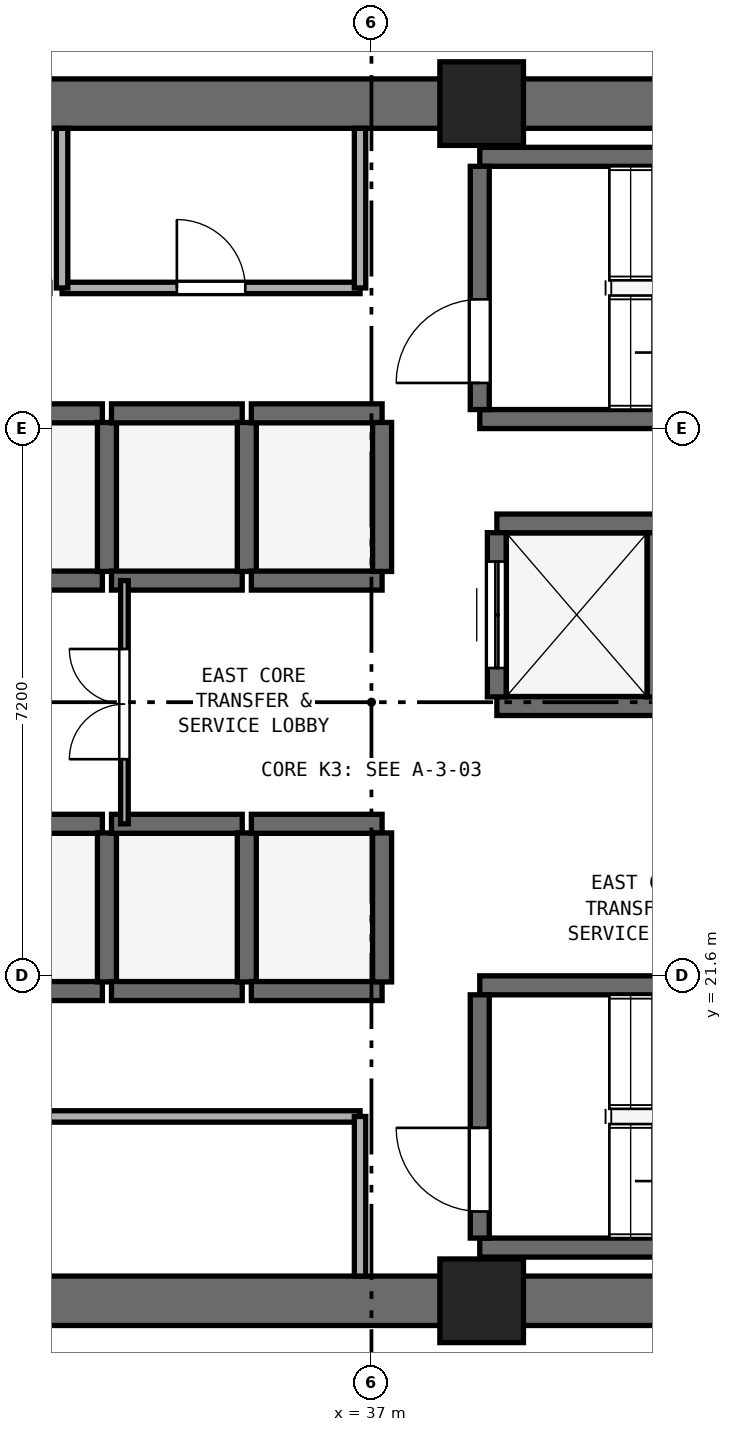
"""IFC4 building model, lengths in metres.
Left out: names, types, materials, properties, quantities, classifications, styles, units other than length and angle.
Written with IfcOpenShell. Run it as: python <this file> out.ifc"""

import sys

from ifc_helpers import new_model, si_unit, direction, frame, frame_2d, origin, origin_2d, place, context, subcontext, project, spatial, rectangle, extrude, element, fill, save


model = new_model("IFC4")
c1 = context("Model", 3, precision=1e-05, world=origin(), true_north=direction((0.0, 1.0)))
c2 = subcontext(c1, "Body", "Model", "MODEL_VIEW")
j1 = project(units=[si_unit("LENGTHUNIT", "METRE"), si_unit("PLANEANGLEUNIT", "RADIAN")], contexts=[c1])
p1 = place(None, origin())
s1 = spatial("IfcSite", under=j1, at=p1, CompositionType="ELEMENT")
p2 = place(p1, origin())
s2 = spatial("IfcBuilding", under=s1, at=p2, CompositionType="ELEMENT")
p3 = place(p2, frame((0.0, 0.0, 47.8)))
s3 = spatial("IfcBuildingStorey", under=s2, at=p3, CompositionType="ELEMENT", Elevation=47.8)
for number, where, z_axis, x_axis in (
    (1, (25.4, 17.325, 0.0), (0.0, 0.0, 1.0), (1.0, 0.0, 0.0)),
    (2, (25.4, 33.075, 0.0), (0.0, 0.0, 1.0), (1.0, 0.0, 0.0)),
):
    element("IfcWall", number, at=place(p3, frame(where, z_axis=z_axis, x_axis=x_axis)), inside=s3, PredefinedType="SHEAR", context=c2, shape_type="SweptSolid", body=[
        extrude(rectangle(XDim=23.2, YDim=0.65, at=frame_2d((11.6, 0.0))), origin(), (0.0, 0.0, 1.0), 3.525),
    ])
for number, where, z_axis, x_axis in (
    (3, (38.45, 17.325, 0.0), (0.0, 0.0, 1.0), (1.0, 0.0, 0.0)),
    (4, (38.45, 33.075, 0.0), (0.0, 0.0, 1.0), (1.0, 0.0, 0.0)),
):
    element("IfcColumn", number, at=place(p3, frame(where, z_axis=z_axis, x_axis=x_axis)), inside=s3, PredefinedType="PILASTER", context=c2, shape_type="SweptSolid", body=[
        extrude(rectangle(XDim=1.1, YDim=1.1, at=origin_2d()), origin(), (0.0, 0.0, 1.0), 3.8),
    ])
for number, where, z_axis, x_axis in (
    (5, (38.425, 28.925, 0.0), (0.0, 0.0, 1.0), (1.0, 0.0, 0.0)),
    (6, (38.425, 32.375, 0.0), (0.0, 0.0, 1.0), (1.0, 0.0, 0.0)),
):
    element("IfcWall", number, at=place(p3, frame(where, z_axis=z_axis, x_axis=x_axis)), inside=s3, PredefinedType="SHEAR", context=c2, shape_type="SweptSolid", body=[
        extrude(rectangle(XDim=7.3, YDim=0.25, at=frame_2d((3.65, 0.0))), origin(), (0.0, 0.0, 1.0), 3.525),
    ])
p4 = place(p3, frame((38.425, 29.05, 0.0), z_axis=(0.0, 0.0, 1.0), x_axis=(0.0, 1.0, 0.0)))
e7 = element("IfcWall", 7, at=p4, inside=s3, PredefinedType="SHEAR", context=c2, shape_type="SweptSolid", body=[
    extrude(rectangle(XDim=3.2, YDim=0.25, at=frame_2d((1.6, 0.0))), origin(), (0.0, 0.0, 1.0), 3.525),
])
p5 = place(p4, frame((0.35, 0.0, 0.0)))
e8 = element("IfcOpeningElement", 8, at=p5, cuts=e7, PredefinedType="OPENING", context=c2, shape_type="SweptSolid", body=[
    extrude(rectangle(XDim=1.1, YDim=2.15, at=frame_2d((0.55, 1.075))), frame((0.0, 0.135, 0.0), z_axis=(0.0, -1.0, 0.0), x_axis=(1.0, 0.0, 0.0)), (0.0, 0.0, 1.0), 0.27),
])
for number, where, z_axis, x_axis in (
    (9, (38.425, 18.025, 0.0), (0.0, 0.0, 1.0), (1.0, 0.0, 0.0)),
    (10, (38.425, 21.475, 0.0), (0.0, 0.0, 1.0), (1.0, 0.0, 0.0)),
):
    element("IfcWall", number, at=place(p3, frame(where, z_axis=z_axis, x_axis=x_axis)), inside=s3, PredefinedType="SHEAR", context=c2, shape_type="SweptSolid", body=[
        extrude(rectangle(XDim=7.3, YDim=0.25, at=frame_2d((3.65, 0.0))), origin(), (0.0, 0.0, 1.0), 3.525),
    ])
p6 = place(p3, frame((38.425, 18.15, 0.0), z_axis=(0.0, 0.0, 1.0), x_axis=(0.0, 1.0, 0.0)))
e11 = element("IfcWall", 11, at=p6, inside=s3, PredefinedType="SHEAR", context=c2, shape_type="SweptSolid", body=[
    extrude(rectangle(XDim=3.2, YDim=0.25, at=frame_2d((1.6, 0.0))), origin(), (0.0, 0.0, 1.0), 3.525),
])
p7 = place(p6, frame((0.35, 0.0, 0.0)))
e12 = element("IfcOpeningElement", 12, at=p7, cuts=e11, PredefinedType="OPENING", context=c2, shape_type="SweptSolid", body=[
    extrude(rectangle(XDim=1.1, YDim=2.15, at=frame_2d((0.55, 1.075))), frame((0.0, 0.135, 0.0), z_axis=(0.0, -1.0, 0.0), x_axis=(1.0, 0.0, 0.0)), (0.0, 0.0, 1.0), 0.27),
])
for number, where, z_axis, x_axis in (
    (13, (31.74, 21.4, 0.0), (0.0, 0.0, 1.0), (1.0, 0.0, 0.0)),
    (14, (31.74, 23.6, 0.0), (0.0, 0.0, 1.0), (1.0, 0.0, 0.0)),
):
    element("IfcWall", number, at=place(p3, frame(where, z_axis=z_axis, x_axis=x_axis)), inside=s3, PredefinedType="SHEAR", context=c2, shape_type="SweptSolid", body=[
        extrude(rectangle(XDim=1.72, YDim=0.25, at=frame_2d((0.86, 0.0))), origin(), (0.0, 0.0, 1.0), 3.525),
    ])
p8 = place(p3, frame((33.52, 21.52, 0.0), z_axis=(0.0, 0.0, 1.0), x_axis=(0.0, 1.0, 0.0)))
e15 = element("IfcWall", 15, at=p8, inside=s3, PredefinedType="SHEAR", context=c2, shape_type="SweptSolid", body=[
    extrude(rectangle(XDim=1.96, YDim=0.25, at=frame_2d((0.98, 0.0))), origin(), (0.0, 0.0, 1.0), 3.525),
])
for number, where, z_axis, x_axis in (
    (16, (33.58, 21.4, 0.0), (0.0, 0.0, 1.0), (1.0, 0.0, 0.0)),
    (17, (33.58, 23.6, 0.0), (0.0, 0.0, 1.0), (1.0, 0.0, 0.0)),
):
    element("IfcWall", number, at=place(p3, frame(where, z_axis=z_axis, x_axis=x_axis)), inside=s3, PredefinedType="SHEAR", context=c2, shape_type="SweptSolid", body=[
        extrude(rectangle(XDim=1.72, YDim=0.25, at=frame_2d((0.86, 0.0))), origin(), (0.0, 0.0, 1.0), 3.525),
    ])
p9 = place(p3, frame((35.36, 21.52, 0.0), z_axis=(0.0, 0.0, 1.0), x_axis=(0.0, 1.0, 0.0)))
e18 = element("IfcWall", 18, at=p9, inside=s3, PredefinedType="SHEAR", context=c2, shape_type="SweptSolid", body=[
    extrude(rectangle(XDim=1.96, YDim=0.25, at=frame_2d((0.98, 0.0))), origin(), (0.0, 0.0, 1.0), 3.525),
])
for number, where, z_axis, x_axis in (
    (19, (35.42, 21.4, 0.0), (0.0, 0.0, 1.0), (1.0, 0.0, 0.0)),
    (20, (35.42, 23.6, 0.0), (0.0, 0.0, 1.0), (1.0, 0.0, 0.0)),
):
    element("IfcWall", number, at=place(p3, frame(where, z_axis=z_axis, x_axis=x_axis)), inside=s3, PredefinedType="SHEAR", context=c2, shape_type="SweptSolid", body=[
        extrude(rectangle(XDim=1.72, YDim=0.25, at=frame_2d((0.86, 0.0))), origin(), (0.0, 0.0, 1.0), 3.525),
    ])
p10 = place(p3, frame((37.14, 21.52, 0.0), z_axis=(0.0, 0.0, 1.0), x_axis=(0.0, 1.0, 0.0)))
e21 = element("IfcWall", 21, at=p10, inside=s3, PredefinedType="SHEAR", context=c2, shape_type="SweptSolid", body=[
    extrude(rectangle(XDim=1.96, YDim=0.25, at=frame_2d((0.98, 0.0))), origin(), (0.0, 0.0, 1.0), 3.525),
])
for number, where, z_axis, x_axis in (
    (22, (31.74, 26.8, 0.0), (0.0, 0.0, 1.0), (1.0, 0.0, 0.0)),
    (23, (31.74, 29.0, 0.0), (0.0, 0.0, 1.0), (1.0, 0.0, 0.0)),
):
    element("IfcWall", number, at=place(p3, frame(where, z_axis=z_axis, x_axis=x_axis)), inside=s3, PredefinedType="SHEAR", context=c2, shape_type="SweptSolid", body=[
        extrude(rectangle(XDim=1.72, YDim=0.25, at=frame_2d((0.86, 0.0))), origin(), (0.0, 0.0, 1.0), 3.525),
    ])
p11 = place(p3, frame((33.52, 26.92, 0.0), z_axis=(0.0, 0.0, 1.0), x_axis=(0.0, 1.0, 0.0)))
e24 = element("IfcWall", 24, at=p11, inside=s3, PredefinedType="SHEAR", context=c2, shape_type="SweptSolid", body=[
    extrude(rectangle(XDim=1.96, YDim=0.25, at=frame_2d((0.98, 0.0))), origin(), (0.0, 0.0, 1.0), 3.525),
])
for number, where, z_axis, x_axis in (
    (25, (33.58, 26.8, 0.0), (0.0, 0.0, 1.0), (1.0, 0.0, 0.0)),
    (26, (33.58, 29.0, 0.0), (0.0, 0.0, 1.0), (1.0, 0.0, 0.0)),
):
    element("IfcWall", number, at=place(p3, frame(where, z_axis=z_axis, x_axis=x_axis)), inside=s3, PredefinedType="SHEAR", context=c2, shape_type="SweptSolid", body=[
        extrude(rectangle(XDim=1.72, YDim=0.25, at=frame_2d((0.86, 0.0))), origin(), (0.0, 0.0, 1.0), 3.525),
    ])
p12 = place(p3, frame((35.36, 26.92, 0.0), z_axis=(0.0, 0.0, 1.0), x_axis=(0.0, 1.0, 0.0)))
e27 = element("IfcWall", 27, at=p12, inside=s3, PredefinedType="SHEAR", context=c2, shape_type="SweptSolid", body=[
    extrude(rectangle(XDim=1.96, YDim=0.25, at=frame_2d((0.98, 0.0))), origin(), (0.0, 0.0, 1.0), 3.525),
])
for number, where, z_axis, x_axis in (
    (28, (35.42, 26.8, 0.0), (0.0, 0.0, 1.0), (1.0, 0.0, 0.0)),
    (29, (35.42, 29.0, 0.0), (0.0, 0.0, 1.0), (1.0, 0.0, 0.0)),
):
    element("IfcWall", number, at=place(p3, frame(where, z_axis=z_axis, x_axis=x_axis)), inside=s3, PredefinedType="SHEAR", context=c2, shape_type="SweptSolid", body=[
        extrude(rectangle(XDim=1.72, YDim=0.25, at=frame_2d((0.86, 0.0))), origin(), (0.0, 0.0, 1.0), 3.525),
    ])
p13 = place(p3, frame((37.14, 26.92, 0.0), z_axis=(0.0, 0.0, 1.0), x_axis=(0.0, 1.0, 0.0)))
e30 = element("IfcWall", 30, at=p13, inside=s3, PredefinedType="SHEAR", context=c2, shape_type="SweptSolid", body=[
    extrude(rectangle(XDim=1.96, YDim=0.25, at=frame_2d((0.98, 0.0))), origin(), (0.0, 0.0, 1.0), 3.525),
])
for number, where, z_axis, x_axis in (
    (31, (38.65, 25.15, 0.0), (0.0, 0.0, 1.0), (1.0, 0.0, 0.0)),
    (32, (38.65, 27.55, 0.0), (0.0, 0.0, 1.0), (1.0, 0.0, 0.0)),
):
    element("IfcWall", number, at=place(p3, frame(where, z_axis=z_axis, x_axis=x_axis)), inside=s3, PredefinedType="SHEAR", context=c2, shape_type="SweptSolid", body=[
        extrude(rectangle(XDim=2.1, YDim=0.25, at=frame_2d((1.05, 0.0))), origin(), (0.0, 0.0, 1.0), 3.525),
    ])
p14 = place(p3, frame((38.65, 25.27, 0.0), z_axis=(0.0, 0.0, 1.0), x_axis=(0.0, 1.0, 0.0)))
e33 = element("IfcWall", 33, at=p14, inside=s3, PredefinedType="SHEAR", context=c2, shape_type="SweptSolid", body=[
    extrude(rectangle(XDim=2.16, YDim=0.25, at=frame_2d((1.08, 0.0))), origin(), (0.0, 0.0, 1.0), 3.525),
])
p15 = place(p14, frame((0.38, 0.0, 0.0)))
e34 = element("IfcOpeningElement", 34, at=p15, cuts=e33, PredefinedType="OPENING", context=c2, shape_type="SweptSolid", body=[
    extrude(rectangle(XDim=1.4, YDim=2.2, at=frame_2d((0.7, 1.1))), frame((0.0, 0.135, 0.0), z_axis=(0.0, -1.0, 0.0), x_axis=(1.0, 0.0, 0.0)), (0.0, 0.0, 1.0), 0.27),
])
p16 = place(p3, frame((40.75, 25.27, 0.0), z_axis=(0.0, 0.0, 1.0), x_axis=(0.0, 1.0, 0.0)))
e35 = element("IfcWall", 35, at=p16, inside=s3, PredefinedType="SHEAR", context=c2, shape_type="SweptSolid", body=[
    extrude(rectangle(XDim=2.16, YDim=0.25, at=frame_2d((1.08, 0.0))), origin(), (0.0, 0.0, 1.0), 3.525),
])
p17 = place(p3, frame((32.93, 30.65, 0.0), z_axis=(0.0, 0.0, 1.0), x_axis=(1.0, 0.0, 0.0)))
e36 = element("IfcWall", 36, at=p17, inside=s3, PredefinedType="PARTITIONING", context=c2, shape_type="SweptSolid", body=[
    extrude(rectangle(XDim=3.92, YDim=0.15, at=frame_2d((1.96, 0.0))), origin(), (0.0, 0.0, 1.0), 3.525),
])
p18 = place(p17, frame((1.51, 0.0, 0.0)))
e37 = element("IfcOpeningElement", 37, at=p18, cuts=e36, PredefinedType="OPENING", context=c2, shape_type="SweptSolid", body=[
    extrude(rectangle(XDim=0.9, YDim=2.1, at=frame_2d((0.45, 1.05))), frame((0.0, 0.085, 0.0), z_axis=(0.0, -1.0, 0.0), x_axis=(1.0, 0.0, 0.0)), (0.0, 0.0, 1.0), 0.17),
])
for number, where, z_axis, x_axis in (
    (38, (32.93, 30.65, 0.0), (0.0, 0.0, 1.0), (0.0, 1.0, 0.0)),
    (39, (36.85, 30.65, 0.0), (0.0, 0.0, 1.0), (0.0, 1.0, 0.0)),
):
    element("IfcWall", number, at=place(p3, frame(where, z_axis=z_axis, x_axis=x_axis)), inside=s3, PredefinedType="PARTITIONING", context=c2, shape_type="SweptSolid", body=[
        extrude(rectangle(XDim=2.1, YDim=0.15, at=frame_2d((1.05, 0.0))), origin(), (0.0, 0.0, 1.0), 3.525),
    ])
p19 = place(p3, frame((26.17, 19.75, 0.0), z_axis=(0.0, 0.0, 1.0), x_axis=(1.0, 0.0, 0.0)))
e40 = element("IfcWall", 40, at=p19, inside=s3, PredefinedType="PARTITIONING", context=c2, shape_type="SweptSolid", body=[
    extrude(rectangle(XDim=10.68, YDim=0.15, at=frame_2d((5.34, 0.0))), origin(), (0.0, 0.0, 1.0), 3.525),
])
p20 = place(p19, frame((4.865, 0.0, 0.0)))
e41 = element("IfcOpeningElement", 41, at=p20, cuts=e40, PredefinedType="OPENING", context=c2, shape_type="SweptSolid", body=[
    extrude(rectangle(XDim=0.95, YDim=2.1, at=frame_2d((0.475, 1.05))), frame((0.0, 0.085, 0.0), z_axis=(0.0, -1.0, 0.0), x_axis=(1.0, 0.0, 0.0)), (0.0, 0.0, 1.0), 0.17),
])
p21 = place(p3, frame((36.85, 17.65, 0.0), z_axis=(0.0, 0.0, 1.0), x_axis=(0.0, 1.0, 0.0)))
e42 = element("IfcWall", 42, at=p21, inside=s3, PredefinedType="PARTITIONING", context=c2, shape_type="SweptSolid", body=[
    extrude(rectangle(XDim=2.1, YDim=0.15, at=frame_2d((1.05, 0.0))), origin(), (0.0, 0.0, 1.0), 3.525),
])
p22 = place(p3, frame((33.75, 23.6, 0.0), z_axis=(0.0, 0.0, 1.0), x_axis=(0.0, 1.0, 0.0)))
e43 = element("IfcWall", 43, at=p22, inside=s3, PredefinedType="PARTITIONING", context=c2, shape_type="SweptSolid", body=[
    extrude(rectangle(XDim=3.2, YDim=0.1, at=frame_2d((1.6, 0.0))), origin(), (0.0, 0.0, 1.0), 3.525),
])
p23 = place(p22, frame((0.85, 0.0, 0.0)))
e44 = element("IfcOpeningElement", 44, at=p23, cuts=e43, PredefinedType="OPENING", context=c2, shape_type="SweptSolid", body=[
    extrude(rectangle(XDim=1.45, YDim=2.12, at=frame_2d((0.725, 1.06))), frame((0.0, 0.06, 0.0), z_axis=(0.0, -1.0, 0.0), x_axis=(1.0, 0.0, 0.0)), (0.0, 0.0, 1.0), 0.12),
])
p24 = place(p5, origin())
e45 = element("IfcDoor", 45, at=p24, inside=s3, OperationType="SINGLE_SWING_LEFT", PredefinedType="DOOR", context=c2, shape_type="SweptSolid", body=[
    extrude(rectangle(XDim=1.1, YDim=2.15, at=frame_2d((0.55, 1.075))), frame((0.0, 0.025, 0.0), z_axis=(0.0, -1.0, 0.0), x_axis=(1.0, 0.0, 0.0)), (0.0, 0.0, 1.0), 0.05),
])
fill(e8, e45)
p25 = place(p7, origin())
e46 = element("IfcDoor", 46, at=p25, inside=s3, OperationType="SINGLE_SWING_RIGHT", PredefinedType="DOOR", context=c2, shape_type="SweptSolid", body=[
    extrude(rectangle(XDim=1.1, YDim=2.15, at=frame_2d((0.55, 1.075))), frame((0.0, 0.025, 0.0), z_axis=(0.0, -1.0, 0.0), x_axis=(1.0, 0.0, 0.0)), (0.0, 0.0, 1.0), 0.05),
])
fill(e12, e46)
p26 = place(p15, origin())
e47 = element("IfcDoor", 47, at=p26, inside=s3, OperationType="DOUBLE_DOOR_SLIDING", PredefinedType="DOOR", context=c2, shape_type="SweptSolid", body=[
    extrude(rectangle(XDim=1.4, YDim=2.2, at=frame_2d((0.7, 1.1))), frame((0.0, 0.025, 0.0), z_axis=(0.0, -1.0, 0.0), x_axis=(1.0, 0.0, 0.0)), (0.0, 0.0, 1.0), 0.05),
])
fill(e34, e47)
p27 = place(p18, origin())
e48 = element("IfcDoor", 48, at=p27, inside=s3, OperationType="SINGLE_SWING_LEFT", PredefinedType="DOOR", context=c2, shape_type="SweptSolid", body=[
    extrude(rectangle(XDim=0.9, YDim=2.1, at=frame_2d((0.45, 1.05))), frame((0.0, 0.025, 0.0), z_axis=(0.0, -1.0, 0.0), x_axis=(1.0, 0.0, 0.0)), (0.0, 0.0, 1.0), 0.05),
])
fill(e37, e48)
p28 = place(p23, origin())
e49 = element("IfcDoor", 49, at=p28, inside=s3, OperationType="DOUBLE_DOOR_SINGLE_SWING", PredefinedType="DOOR", context=c2, shape_type="SweptSolid", body=[
    extrude(rectangle(XDim=1.45, YDim=2.12, at=frame_2d((0.725, 1.06))), frame((0.0, 0.025, 0.0), z_axis=(0.0, -1.0, 0.0), x_axis=(1.0, 0.0, 0.0)), (0.0, 0.0, 1.0), 0.05),
])
fill(e44, e49)
save(model, sys.argv[1])
